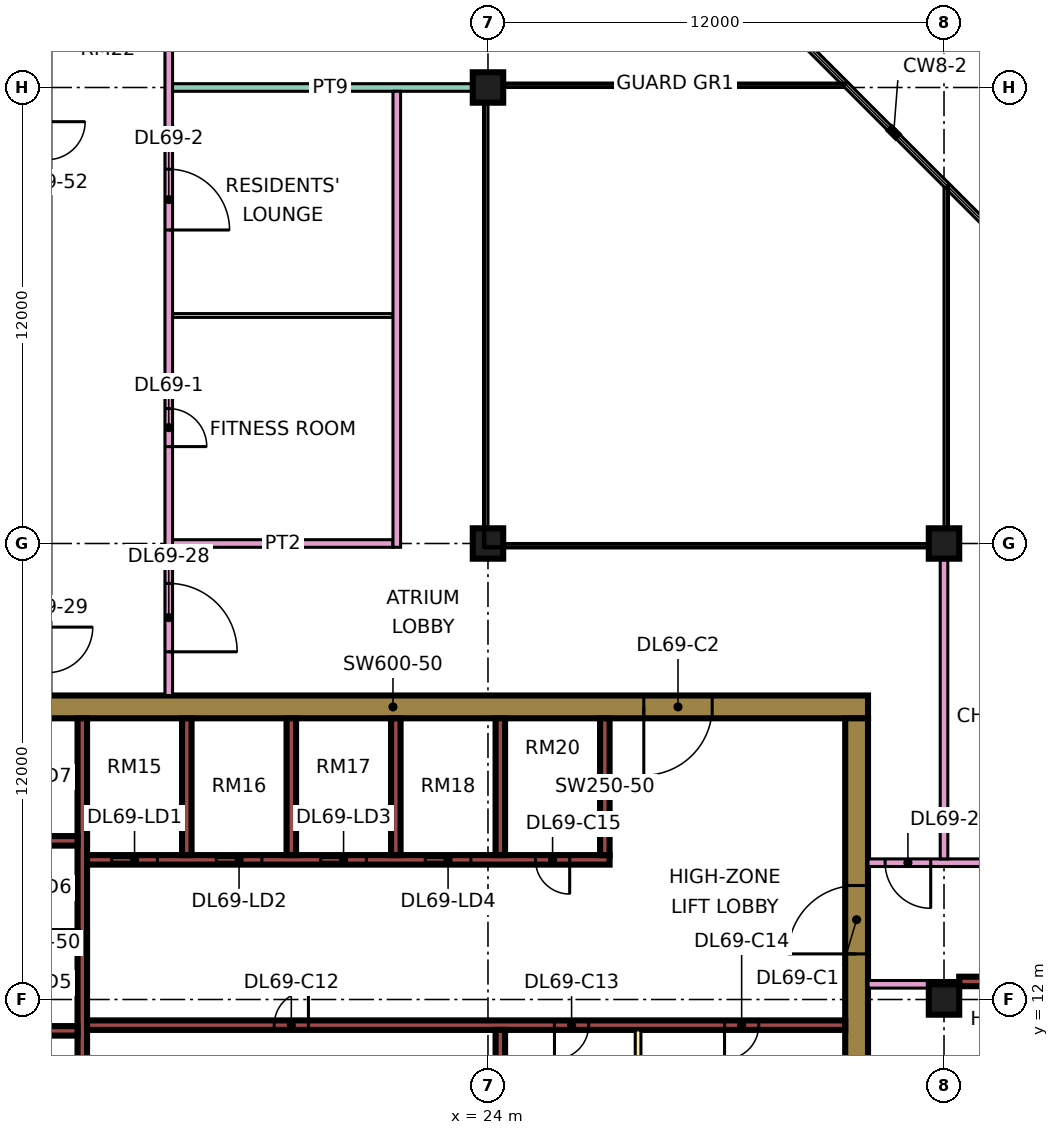
"""IFC4 building model, lengths in metres.
Left out: names, types, materials, properties, quantities, classifications, styles, units other than length and angle.
Written with IfcOpenShell. Run it as: python <this file> out.ifc"""

import sys

from ifc_helpers import new_model, si_unit, direction, frame, frame_2d, origin, origin_2d, place, context, subcontext, project, spatial, rectangle, extrude, element, fill, save


model = new_model("IFC4")
c1 = context("Model", 3, precision=1e-05, world=origin(), true_north=direction((0.0, 1.0)))
c2 = subcontext(c1, "Body", "Model", "MODEL_VIEW")
j1 = project(units=[si_unit("LENGTHUNIT", "METRE"), si_unit("PLANEANGLEUNIT", "RADIAN")], contexts=[c1])
p1 = place(None, origin())
s1 = spatial("IfcSite", under=j1, at=p1, CompositionType="ELEMENT")
p2 = place(p1, origin())
s2 = spatial("IfcBuilding", under=s1, at=p2, CompositionType="ELEMENT")
p3 = place(p2, frame((0.0, 0.0, 295.9)))
s3 = spatial("IfcBuildingStorey", under=s2, at=p3, CompositionType="ELEMENT", Elevation=295.9)
for number, where, z_axis, x_axis in (
    (1, (24.0, 24.0, 0.0), (0.0, 0.0, 1.0), (1.0, 0.0, 0.0)),
    (2, (24.0, 36.0, 0.0), (0.0, 0.0, 1.0), (1.0, 0.0, 0.0)),
    (3, (36.0, 12.0, 0.0), (0.0, 0.0, 1.0), (1.0, 0.0, 0.0)),
    (4, (36.0, 24.0, 0.0), (0.0, 0.0, 1.0), (1.0, 0.0, 0.0)),
):
    element("IfcColumn", number, at=place(p3, frame(where, z_axis=z_axis, x_axis=x_axis)), inside=s3, PredefinedType="COLUMN", context=c2, shape_type="SweptSolid", body=[
        extrude(rectangle(XDim=0.8, YDim=0.8, at=origin_2d()), origin(), (0.0, 0.0, 1.0), 3.75),
    ])
p4 = place(p3, frame((9.0, 19.7, 0.0), z_axis=(0.0, 0.0, 1.0), x_axis=(1.0, 0.0, 0.0)))
e5 = element("IfcWall", 5, at=p4, inside=s3, PredefinedType="SHEAR", context=c2, shape_type="SweptSolid", body=[
    extrude(rectangle(XDim=25.0, YDim=0.6, at=frame_2d((12.5, 0.0))), origin(), (0.0, 0.0, 1.0), 3.75),
])
p5 = place(p4, frame((19.1, 0.0, 0.0)))
e6 = element("IfcOpeningElement", 6, at=p5, cuts=e5, PredefinedType="OPENING", context=c2, shape_type="SweptSolid", body=[
    extrude(rectangle(XDim=1.8, YDim=2.4, at=frame_2d((0.9, 1.2))), frame((0.0, 0.31, 0.0), z_axis=(0.0, -1.0, 0.0), x_axis=(1.0, 0.0, 0.0)), (0.0, 0.0, 1.0), 0.62),
])
p6 = place(p3, frame((33.7, 7.6, 0.0), z_axis=(0.0, 0.0, 1.0), x_axis=(0.0, 1.0, 0.0)))
e7 = element("IfcWall", 7, at=p6, inside=s3, PredefinedType="SHEAR", context=c2, shape_type="SweptSolid", body=[
    extrude(rectangle(XDim=11.8, YDim=0.6, at=frame_2d((5.9, 0.0))), origin(), (0.0, 0.0, 1.0), 3.75),
])
p7 = place(p6, frame((5.6, 0.0, 0.0)))
e8 = element("IfcOpeningElement", 8, at=p7, cuts=e7, PredefinedType="OPENING", context=c2, shape_type="SweptSolid", body=[
    extrude(rectangle(XDim=1.8, YDim=2.4, at=frame_2d((0.9, 1.2))), frame((0.0, 0.31, 0.0), z_axis=(0.0, -1.0, 0.0), x_axis=(1.0, 0.0, 0.0)), (0.0, 0.0, 1.0), 0.62),
])
p8 = place(p3, frame((13.325, 7.6, 0.0), z_axis=(0.0, 0.0, 1.0), x_axis=(0.0, 1.0, 0.0)))
e9 = element("IfcWall", 9, at=p8, inside=s3, PredefinedType="SHEAR", context=c2, shape_type="SweptSolid", body=[
    extrude(rectangle(XDim=11.8, YDim=0.25, at=frame_2d((5.9, 0.0))), origin(), (0.0, 0.0, 1.0), 3.75),
])
p9 = place(p3, frame((13.45, 11.325, 0.0), z_axis=(0.0, 0.0, 1.0), x_axis=(1.0, 0.0, 0.0)))
e10 = element("IfcWall", 10, at=p9, inside=s3, PredefinedType="SHEAR", context=c2, shape_type="SweptSolid", body=[
    extrude(rectangle(XDim=19.95, YDim=0.25, at=frame_2d((9.975, 0.0))), origin(), (0.0, 0.0, 1.0), 3.75),
])
p10 = place(p9, frame((4.925, 0.0, 0.0)))
e11 = element("IfcOpeningElement", 11, at=p10, cuts=e10, PredefinedType="OPENING", context=c2, shape_type="SweptSolid", body=[
    extrude(rectangle(XDim=0.9, YDim=2.1, at=frame_2d((0.45, 1.05))), frame((0.0, 0.135, 0.0), z_axis=(0.0, -1.0, 0.0), x_axis=(1.0, 0.0, 0.0)), (0.0, 0.0, 1.0), 0.27),
])
p11 = place(p9, frame((12.3, 0.0, 0.0)))
e12 = element("IfcOpeningElement", 12, at=p11, cuts=e10, PredefinedType="OPENING", context=c2, shape_type="SweptSolid", body=[
    extrude(rectangle(XDim=0.9, YDim=2.1, at=frame_2d((0.45, 1.05))), frame((0.0, 0.135, 0.0), z_axis=(0.0, -1.0, 0.0), x_axis=(1.0, 0.0, 0.0)), (0.0, 0.0, 1.0), 0.27),
])
p12 = place(p9, frame((16.775, 0.0, 0.0)))
e13 = element("IfcOpeningElement", 13, at=p12, cuts=e10, PredefinedType="OPENING", context=c2, shape_type="SweptSolid", body=[
    extrude(rectangle(XDim=0.9, YDim=2.1, at=frame_2d((0.45, 1.05))), frame((0.0, 0.135, 0.0), z_axis=(0.0, -1.0, 0.0), x_axis=(1.0, 0.0, 0.0)), (0.0, 0.0, 1.0), 0.27),
])
p13 = place(p3, frame((13.45, 15.675, 0.0), z_axis=(0.0, 0.0, 1.0), x_axis=(1.0, 0.0, 0.0)))
e14 = element("IfcWall", 14, at=p13, inside=s3, PredefinedType="SHEAR", context=c2, shape_type="SweptSolid", body=[
    extrude(rectangle(XDim=13.75, YDim=0.25, at=frame_2d((6.875, 0.0))), origin(), (0.0, 0.0, 1.0), 3.75),
])
p14 = place(p13, frame((0.65, 0.0, 0.0)))
e15 = element("IfcOpeningElement", 15, at=p14, cuts=e14, PredefinedType="OPENING", context=c2, shape_type="SweptSolid", body=[
    extrude(rectangle(XDim=1.2, YDim=2.2, at=frame_2d((0.6, 1.1))), frame((0.0, 0.135, 0.0), z_axis=(0.0, -1.0, 0.0), x_axis=(1.0, 0.0, 0.0)), (0.0, 0.0, 1.0), 0.27),
])
p15 = place(p13, frame((3.4, 0.0, 0.0)))
e16 = element("IfcOpeningElement", 16, at=p15, cuts=e14, PredefinedType="OPENING", context=c2, shape_type="SweptSolid", body=[
    extrude(rectangle(XDim=1.2, YDim=2.2, at=frame_2d((0.6, 1.1))), frame((0.0, 0.135, 0.0), z_axis=(0.0, -1.0, 0.0), x_axis=(1.0, 0.0, 0.0)), (0.0, 0.0, 1.0), 0.27),
])
p16 = place(p13, frame((6.15, 0.0, 0.0)))
e17 = element("IfcOpeningElement", 17, at=p16, cuts=e14, PredefinedType="OPENING", context=c2, shape_type="SweptSolid", body=[
    extrude(rectangle(XDim=1.2, YDim=2.2, at=frame_2d((0.6, 1.1))), frame((0.0, 0.135, 0.0), z_axis=(0.0, -1.0, 0.0), x_axis=(1.0, 0.0, 0.0)), (0.0, 0.0, 1.0), 0.27),
])
p17 = place(p13, frame((8.9, 0.0, 0.0)))
e18 = element("IfcOpeningElement", 18, at=p17, cuts=e14, PredefinedType="OPENING", context=c2, shape_type="SweptSolid", body=[
    extrude(rectangle(XDim=1.2, YDim=2.2, at=frame_2d((0.6, 1.1))), frame((0.0, 0.135, 0.0), z_axis=(0.0, -1.0, 0.0), x_axis=(1.0, 0.0, 0.0)), (0.0, 0.0, 1.0), 0.27),
])
p18 = place(p13, frame((11.8, 0.0, 0.0)))
e19 = element("IfcOpeningElement", 19, at=p18, cuts=e14, PredefinedType="OPENING", context=c2, shape_type="SweptSolid", body=[
    extrude(rectangle(XDim=0.9, YDim=2.1, at=frame_2d((0.45, 1.05))), frame((0.0, 0.135, 0.0), z_axis=(0.0, -1.0, 0.0), x_axis=(1.0, 0.0, 0.0)), (0.0, 0.0, 1.0), 0.27),
])
for number, where, z_axis, x_axis in (
    (20, (10.2, 11.175, 0.0), (0.0, 0.0, 1.0), (1.0, 0.0, 0.0)),
    (21, (10.2, 13.675, 0.0), (0.0, 0.0, 1.0), (1.0, 0.0, 0.0)),
    (22, (10.2, 16.175, 0.0), (0.0, 0.0, 1.0), (1.0, 0.0, 0.0)),
):
    element("IfcWall", number, at=place(p3, frame(where, z_axis=z_axis, x_axis=x_axis)), inside=s3, PredefinedType="SHEAR", context=c2, shape_type="SweptSolid", body=[
        extrude(rectangle(XDim=3.0, YDim=0.25, at=frame_2d((1.5, 0.0))), origin(), (0.0, 0.0, 1.0), 3.75),
    ])
for number, where, z_axis, x_axis in (
    (23, (24.325, 7.6, 0.0), (0.0, 0.0, 1.0), (0.0, 1.0, 0.0)),
    (24, (16.075, 15.8, 0.0), (0.0, 0.0, 1.0), (0.0, 1.0, 0.0)),
    (25, (18.825, 15.8, 0.0), (0.0, 0.0, 1.0), (0.0, 1.0, 0.0)),
    (26, (21.575, 15.8, 0.0), (0.0, 0.0, 1.0), (0.0, 1.0, 0.0)),
    (27, (24.325, 15.8, 0.0), (0.0, 0.0, 1.0), (0.0, 1.0, 0.0)),
    (28, (27.075, 15.8, 0.0), (0.0, 0.0, 1.0), (0.0, 1.0, 0.0)),
):
    element("IfcWall", number, at=place(p3, frame(where, z_axis=z_axis, x_axis=x_axis)), inside=s3, PredefinedType="SHEAR", context=c2, shape_type="SweptSolid", body=[
        extrude(rectangle(XDim=3.6, YDim=0.25, at=frame_2d((1.8, 0.0))), origin(), (0.0, 0.0, 1.0), 3.75),
    ])
p19 = place(p3, frame((36.4, 12.475, 0.0), z_axis=(0.0, 0.0, 1.0), x_axis=(1.0, 0.0, 0.0)))
e29 = element("IfcWall", 29, at=p19, inside=s3, PredefinedType="SHEAR", context=c2, shape_type="SweptSolid", body=[
    extrude(rectangle(XDim=4.25, YDim=0.25, at=frame_2d((2.125, 0.0))), origin(), (0.0, 0.0, 1.0), 3.75),
])
p20 = place(p19, frame((1.975, 0.0, 0.0)))
e30 = element("IfcOpeningElement", 30, at=p20, cuts=e29, PredefinedType="OPENING", context=c2, shape_type="SweptSolid", body=[
    extrude(rectangle(XDim=1.1, YDim=2.2, at=frame_2d((0.55, 1.1))), frame((0.0, 0.135, 0.0), z_axis=(0.0, -1.0, 0.0), x_axis=(1.0, 0.0, 0.0)), (0.0, 0.0, 1.0), 0.27),
])
p21 = place(p3, frame((-1.447, 12.553, 0.0), z_axis=(0.0, 0.0, 1.0), x_axis=(0.707106781187, -0.707106781187, 0.0)))
e31 = element("IfcWall", 31, at=p21, inside=s3, PredefinedType="SOLIDWALL", context=c2, shape_type="SweptSolid", body=[
    extrude(rectangle(XDim=19.799, YDim=0.15, at=frame_2d((9.899, 0.0))), origin(), (0.0, 0.0, 1.0), 3.35),
])
p22 = place(p21, frame((2.212, 0.0, 0.45)))
e32 = element("IfcOpeningElement", 32, at=p22, cuts=e31, PredefinedType="OPENING", context=c2, shape_type="SweptSolid", body=[
    extrude(rectangle(XDim=3.0, YDim=2.4, at=frame_2d((1.5, 1.2))), frame((0.0, 0.085, 0.0), z_axis=(0.0, -1.0, 0.0), x_axis=(1.0, 0.0, 0.0)), (0.0, 0.0, 1.0), 0.17),
])
p23 = place(p21, frame((10.216, 0.0, 0.45)))
e33 = element("IfcOpeningElement", 33, at=p23, cuts=e31, PredefinedType="OPENING", context=c2, shape_type="SweptSolid", body=[
    extrude(rectangle(XDim=3.0, YDim=2.4, at=frame_2d((1.5, 1.2))), frame((0.0, 0.085, 0.0), z_axis=(0.0, -1.0, 0.0), x_axis=(1.0, 0.0, 0.0)), (0.0, 0.0, 1.0), 0.17),
])
p24 = place(p3, frame((27.95, 7.6, 0.0), z_axis=(0.0, 0.0, 1.0), x_axis=(0.0, 1.0, 0.0)))
e34 = element("IfcWall", 34, at=p24, inside=s3, PredefinedType="PARTITIONING", context=c2, shape_type="SweptSolid", body=[
    extrude(rectangle(XDim=3.6, YDim=0.15, at=frame_2d((1.8, 0.0))), origin(), (0.0, 0.0, 1.0), 3.35),
])
p25 = place(p3, frame((15.6, 20.0, 0.0), z_axis=(0.0, 0.0, 1.0), x_axis=(0.0, 1.0, 0.0)))
e35 = element("IfcWall", 35, at=p25, inside=s3, PredefinedType="PARTITIONING", context=c2, shape_type="SweptSolid", body=[
    extrude(rectangle(XDim=27.775, YDim=0.2, at=frame_2d((13.887, 0.0))), origin(), (0.0, 0.0, 1.0), 3.35),
])
p26 = place(p25, frame((6.55, 0.0, 0.0)))
e36 = element("IfcOpeningElement", 36, at=p26, cuts=e35, PredefinedType="OPENING", context=c2, shape_type="SweptSolid", body=[
    extrude(rectangle(XDim=1.0, YDim=2.1, at=frame_2d((0.5, 1.05))), frame((0.0, 0.11, 0.0), z_axis=(0.0, -1.0, 0.0), x_axis=(1.0, 0.0, 0.0)), (0.0, 0.0, 1.0), 0.22),
])
p27 = place(p25, frame((12.25, 0.0, 0.0)))
e37 = element("IfcOpeningElement", 37, at=p27, cuts=e35, PredefinedType="OPENING", context=c2, shape_type="SweptSolid", body=[
    extrude(rectangle(XDim=1.6, YDim=2.1, at=frame_2d((0.8, 1.05))), frame((0.0, 0.11, 0.0), z_axis=(0.0, -1.0, 0.0), x_axis=(1.0, 0.0, 0.0)), (0.0, 0.0, 1.0), 0.22),
])
p28 = place(p25, frame((17.2, 0.0, 0.0)))
e38 = element("IfcOpeningElement", 38, at=p28, cuts=e35, PredefinedType="OPENING", context=c2, shape_type="SweptSolid", body=[
    extrude(rectangle(XDim=1.0, YDim=2.1, at=frame_2d((0.5, 1.05))), frame((0.0, 0.11, 0.0), z_axis=(0.0, -1.0, 0.0), x_axis=(1.0, 0.0, 0.0)), (0.0, 0.0, 1.0), 0.22),
])
p29 = place(p25, frame((1.15, 0.0, 0.0)))
e39 = element("IfcOpeningElement", 39, at=p29, cuts=e35, PredefinedType="OPENING", context=c2, shape_type="SweptSolid", body=[
    extrude(rectangle(XDim=1.8, YDim=2.1, at=frame_2d((0.9, 1.05))), frame((0.0, 0.11, 0.0), z_axis=(0.0, -1.0, 0.0), x_axis=(1.0, 0.0, 0.0)), (0.0, 0.0, 1.0), 0.22),
])
p30 = place(p25, frame((25.9, 0.0, 0.0)))
e40 = element("IfcOpeningElement", 40, at=p30, cuts=e35, PredefinedType="OPENING", context=c2, shape_type="SweptSolid", body=[
    extrude(rectangle(XDim=1.0, YDim=2.1, at=frame_2d((0.5, 1.05))), frame((0.0, 0.11, 0.0), z_axis=(0.0, -1.0, 0.0), x_axis=(1.0, 0.0, 0.0)), (0.0, 0.0, 1.0), 0.22),
])
p31 = place(p3, frame((15.7, 24.0, 0.0), z_axis=(0.0, 0.0, 1.0), x_axis=(1.0, 0.0, 0.0)))
e41 = element("IfcWall", 41, at=p31, inside=s3, PredefinedType="PARTITIONING", context=c2, shape_type="SweptSolid", body=[
    extrude(rectangle(XDim=5.8, YDim=0.2, at=frame_2d((2.9, 0.0))), origin(), (0.0, 0.0, 1.0), 3.35),
])
p32 = place(p3, frame((15.7, 30.0, 0.0), z_axis=(0.0, 0.0, 1.0), x_axis=(1.0, 0.0, 0.0)))
e42 = element("IfcWall", 42, at=p32, inside=s3, PredefinedType="PARTITIONING", context=c2, shape_type="SweptSolid", body=[
    extrude(rectangle(XDim=5.8, YDim=0.1, at=frame_2d((2.9, 0.0))), origin(), (0.0, 0.0, 1.0), 3.35),
])
p33 = place(p3, frame((15.7, 36.0, 0.0), z_axis=(0.0, 0.0, 1.0), x_axis=(1.0, 0.0, 0.0)))
e43 = element("IfcWall", 43, at=p33, inside=s3, PredefinedType="PARTITIONING", context=c2, shape_type="SweptSolid", body=[
    extrude(rectangle(XDim=8.3, YDim=0.2, at=frame_2d((4.15, 0.0))), origin(), (0.0, 0.0, 1.0), 3.35),
])
p34 = place(p3, frame((21.6, 23.9, 0.0), z_axis=(0.0, 0.0, 1.0), x_axis=(0.0, 1.0, 0.0)))
e44 = element("IfcWall", 44, at=p34, inside=s3, PredefinedType="PARTITIONING", context=c2, shape_type="SweptSolid", body=[
    extrude(rectangle(XDim=12.0, YDim=0.2, at=frame_2d((6.0, 0.0))), origin(), (0.0, 0.0, 1.0), 3.35),
])
p35 = place(p3, frame((34.0, 12.4, 0.0), z_axis=(0.0, 0.0, 1.0), x_axis=(1.0, 0.0, 0.0)))
e45 = element("IfcWall", 45, at=p35, inside=s3, PredefinedType="PARTITIONING", context=c2, shape_type="SweptSolid", body=[
    extrude(rectangle(XDim=2.401, YDim=0.2, at=frame_2d((1.2, 0.0))), origin(), (0.0, 0.0, 1.0), 3.35),
])
p36 = place(p3, frame((34.0, 15.6, 0.0), z_axis=(0.0, 0.0, 1.0), x_axis=(1.0, 0.0, 0.0)))
e46 = element("IfcWall", 46, at=p36, inside=s3, PredefinedType="PARTITIONING", context=c2, shape_type="SweptSolid", body=[
    extrude(rectangle(XDim=10.35, YDim=0.2, at=frame_2d((5.175, 0.0))), origin(), (0.0, 0.0, 1.0), 3.35),
])
p37 = place(p36, frame((5.6, 0.0, 0.0)))
e47 = element("IfcOpeningElement", 47, at=p37, cuts=e46, PredefinedType="OPENING", context=c2, shape_type="SweptSolid", body=[
    extrude(rectangle(XDim=1.0, YDim=2.1, at=frame_2d((0.5, 1.05))), frame((0.0, 0.11, 0.0), z_axis=(0.0, -1.0, 0.0), x_axis=(1.0, 0.0, 0.0)), (0.0, 0.0, 1.0), 0.22),
])
p38 = place(p36, frame((0.45, 0.0, 0.0)))
e48 = element("IfcOpeningElement", 48, at=p38, cuts=e46, PredefinedType="OPENING", context=c2, shape_type="SweptSolid", body=[
    extrude(rectangle(XDim=1.2, YDim=2.1, at=frame_2d((0.6, 1.05))), frame((0.0, 0.11, 0.0), z_axis=(0.0, -1.0, 0.0), x_axis=(1.0, 0.0, 0.0)), (0.0, 0.0, 1.0), 0.22),
])
p39 = place(p3, frame((36.0, 15.7, 0.0), z_axis=(0.0, 0.0, 1.0), x_axis=(0.0, 1.0, 0.0)))
e49 = element("IfcWall", 49, at=p39, inside=s3, PredefinedType="PARTITIONING", context=c2, shape_type="SweptSolid", body=[
    extrude(rectangle(XDim=8.3, YDim=0.2, at=frame_2d((4.15, 0.0))), origin(), (0.0, 0.0, 1.0), 3.35),
])
p40 = place(p14, origin())
e50 = element("IfcDoor", 50, at=p40, inside=s3, OperationType="DOUBLE_DOOR_SLIDING", PredefinedType="DOOR", context=c2, shape_type="SweptSolid", body=[
    extrude(rectangle(XDim=1.2, YDim=2.2, at=frame_2d((0.6, 1.1))), frame((0.0, 0.025, 0.0), z_axis=(0.0, -1.0, 0.0), x_axis=(1.0, 0.0, 0.0)), (0.0, 0.0, 1.0), 0.05),
])
fill(e15, e50)
p41 = place(p15, origin())
e51 = element("IfcDoor", 51, at=p41, inside=s3, OperationType="DOUBLE_DOOR_SLIDING", PredefinedType="DOOR", context=c2, shape_type="SweptSolid", body=[
    extrude(rectangle(XDim=1.2, YDim=2.2, at=frame_2d((0.6, 1.1))), frame((0.0, 0.025, 0.0), z_axis=(0.0, -1.0, 0.0), x_axis=(1.0, 0.0, 0.0)), (0.0, 0.0, 1.0), 0.05),
])
fill(e16, e51)
p42 = place(p16, origin())
e52 = element("IfcDoor", 52, at=p42, inside=s3, OperationType="DOUBLE_DOOR_SLIDING", PredefinedType="DOOR", context=c2, shape_type="SweptSolid", body=[
    extrude(rectangle(XDim=1.2, YDim=2.2, at=frame_2d((0.6, 1.1))), frame((0.0, 0.025, 0.0), z_axis=(0.0, -1.0, 0.0), x_axis=(1.0, 0.0, 0.0)), (0.0, 0.0, 1.0), 0.05),
])
fill(e17, e52)
p43 = place(p17, origin())
e53 = element("IfcDoor", 53, at=p43, inside=s3, OperationType="DOUBLE_DOOR_SLIDING", PredefinedType="DOOR", context=c2, shape_type="SweptSolid", body=[
    extrude(rectangle(XDim=1.2, YDim=2.2, at=frame_2d((0.6, 1.1))), frame((0.0, 0.025, 0.0), z_axis=(0.0, -1.0, 0.0), x_axis=(1.0, 0.0, 0.0)), (0.0, 0.0, 1.0), 0.05),
])
fill(e18, e53)
p44 = place(p7, origin())
e54 = element("IfcDoor", 54, at=p44, inside=s3, OperationType="DOUBLE_DOOR_SINGLE_SWING", PredefinedType="DOOR", context=c2, shape_type="SweptSolid", body=[
    extrude(rectangle(XDim=1.8, YDim=2.4, at=frame_2d((0.9, 1.2))), frame((0.0, 0.025, 0.0), z_axis=(0.0, -1.0, 0.0), x_axis=(1.0, 0.0, 0.0)), (0.0, 0.0, 1.0), 0.05),
])
fill(e8, e54)
p45 = place(p5, frame((1.8, 0.0, 0.0), z_axis=(0.0, 0.0, 1.0), x_axis=(-1.0, 0.0, 0.0)))
e55 = element("IfcDoor", 55, at=p45, inside=s3, OperationType="DOUBLE_DOOR_SINGLE_SWING", PredefinedType="DOOR", context=c2, shape_type="SweptSolid", body=[
    extrude(rectangle(XDim=1.8, YDim=2.4, at=frame_2d((0.9, 1.2))), frame((0.0, 0.025, 0.0), z_axis=(0.0, -1.0, 0.0), x_axis=(1.0, 0.0, 0.0)), (0.0, 0.0, 1.0), 0.05),
])
fill(e6, e55)
p46 = place(p10, frame((0.9, 0.0, 0.0), z_axis=(0.0, 0.0, 1.0), x_axis=(-1.0, 0.0, 0.0)))
e56 = element("IfcDoor", 56, at=p46, inside=s3, OperationType="SINGLE_SWING_RIGHT", PredefinedType="DOOR", context=c2, shape_type="SweptSolid", body=[
    extrude(rectangle(XDim=0.9, YDim=2.1, at=frame_2d((0.45, 1.05))), frame((0.0, 0.025, 0.0), z_axis=(0.0, -1.0, 0.0), x_axis=(1.0, 0.0, 0.0)), (0.0, 0.0, 1.0), 0.05),
])
fill(e11, e56)
p47 = place(p11, frame((0.9, 0.0, 0.0), z_axis=(0.0, 0.0, 1.0), x_axis=(-1.0, 0.0, 0.0)))
e57 = element("IfcDoor", 57, at=p47, inside=s3, OperationType="SINGLE_SWING_LEFT", PredefinedType="DOOR", context=c2, shape_type="SweptSolid", body=[
    extrude(rectangle(XDim=0.9, YDim=2.1, at=frame_2d((0.45, 1.05))), frame((0.0, 0.025, 0.0), z_axis=(0.0, -1.0, 0.0), x_axis=(1.0, 0.0, 0.0)), (0.0, 0.0, 1.0), 0.05),
])
fill(e12, e57)
p48 = place(p12, frame((0.9, 0.0, 0.0), z_axis=(0.0, 0.0, 1.0), x_axis=(-1.0, 0.0, 0.0)))
e58 = element("IfcDoor", 58, at=p48, inside=s3, OperationType="SINGLE_SWING_LEFT", PredefinedType="DOOR", context=c2, shape_type="SweptSolid", body=[
    extrude(rectangle(XDim=0.9, YDim=2.1, at=frame_2d((0.45, 1.05))), frame((0.0, 0.025, 0.0), z_axis=(0.0, -1.0, 0.0), x_axis=(1.0, 0.0, 0.0)), (0.0, 0.0, 1.0), 0.05),
])
fill(e13, e58)
p49 = place(p18, origin())
e59 = element("IfcDoor", 59, at=p49, inside=s3, OperationType="SINGLE_SWING_RIGHT", PredefinedType="DOOR", context=c2, shape_type="SweptSolid", body=[
    extrude(rectangle(XDim=0.9, YDim=2.1, at=frame_2d((0.45, 1.05))), frame((0.0, 0.025, 0.0), z_axis=(0.0, -1.0, 0.0), x_axis=(1.0, 0.0, 0.0)), (0.0, 0.0, 1.0), 0.05),
])
fill(e19, e59)
p50 = place(p26, frame((1.0, 0.0, 0.0), z_axis=(0.0, 0.0, 1.0), x_axis=(-1.0, 0.0, 0.0)))
e60 = element("IfcDoor", 60, at=p50, inside=s3, OperationType="SINGLE_SWING_LEFT", PredefinedType="DOOR", context=c2, shape_type="SweptSolid", body=[
    extrude(rectangle(XDim=1.0, YDim=2.1, at=frame_2d((0.5, 1.05))), frame((0.0, 0.025, 0.0), z_axis=(0.0, -1.0, 0.0), x_axis=(1.0, 0.0, 0.0)), (0.0, 0.0, 1.0), 0.05),
])
fill(e36, e60)
p51 = place(p27, frame((1.6, 0.0, 0.0), z_axis=(0.0, 0.0, 1.0), x_axis=(-1.0, 0.0, 0.0)))
e61 = element("IfcDoor", 61, at=p51, inside=s3, OperationType="DOUBLE_DOOR_SINGLE_SWING", PredefinedType="DOOR", context=c2, shape_type="SweptSolid", body=[
    extrude(rectangle(XDim=1.6, YDim=2.1, at=frame_2d((0.8, 1.05))), frame((0.0, 0.025, 0.0), z_axis=(0.0, -1.0, 0.0), x_axis=(1.0, 0.0, 0.0)), (0.0, 0.0, 1.0), 0.05),
])
fill(e37, e61)
p52 = place(p38, origin())
e62 = element("IfcDoor", 62, at=p52, inside=s3, OperationType="SINGLE_SWING_RIGHT", PredefinedType="DOOR", context=c2, shape_type="SweptSolid", body=[
    extrude(rectangle(XDim=1.2, YDim=2.1, at=frame_2d((0.6, 1.05))), frame((0.0, 0.025, 0.0), z_axis=(0.0, -1.0, 0.0), x_axis=(1.0, 0.0, 0.0)), (0.0, 0.0, 1.0), 0.05),
])
fill(e48, e62)
p53 = place(p29, frame((1.8, 0.0, 0.0), z_axis=(0.0, 0.0, 1.0), x_axis=(-1.0, 0.0, 0.0)))
e63 = element("IfcDoor", 63, at=p53, inside=s3, OperationType="DOUBLE_DOOR_SINGLE_SWING", PredefinedType="DOOR", context=c2, shape_type="SweptSolid", body=[
    extrude(rectangle(XDim=1.8, YDim=2.1, at=frame_2d((0.9, 1.05))), frame((0.0, 0.025, 0.0), z_axis=(0.0, -1.0, 0.0), x_axis=(1.0, 0.0, 0.0)), (0.0, 0.0, 1.0), 0.05),
])
fill(e39, e63)
save(model, sys.argv[1])
